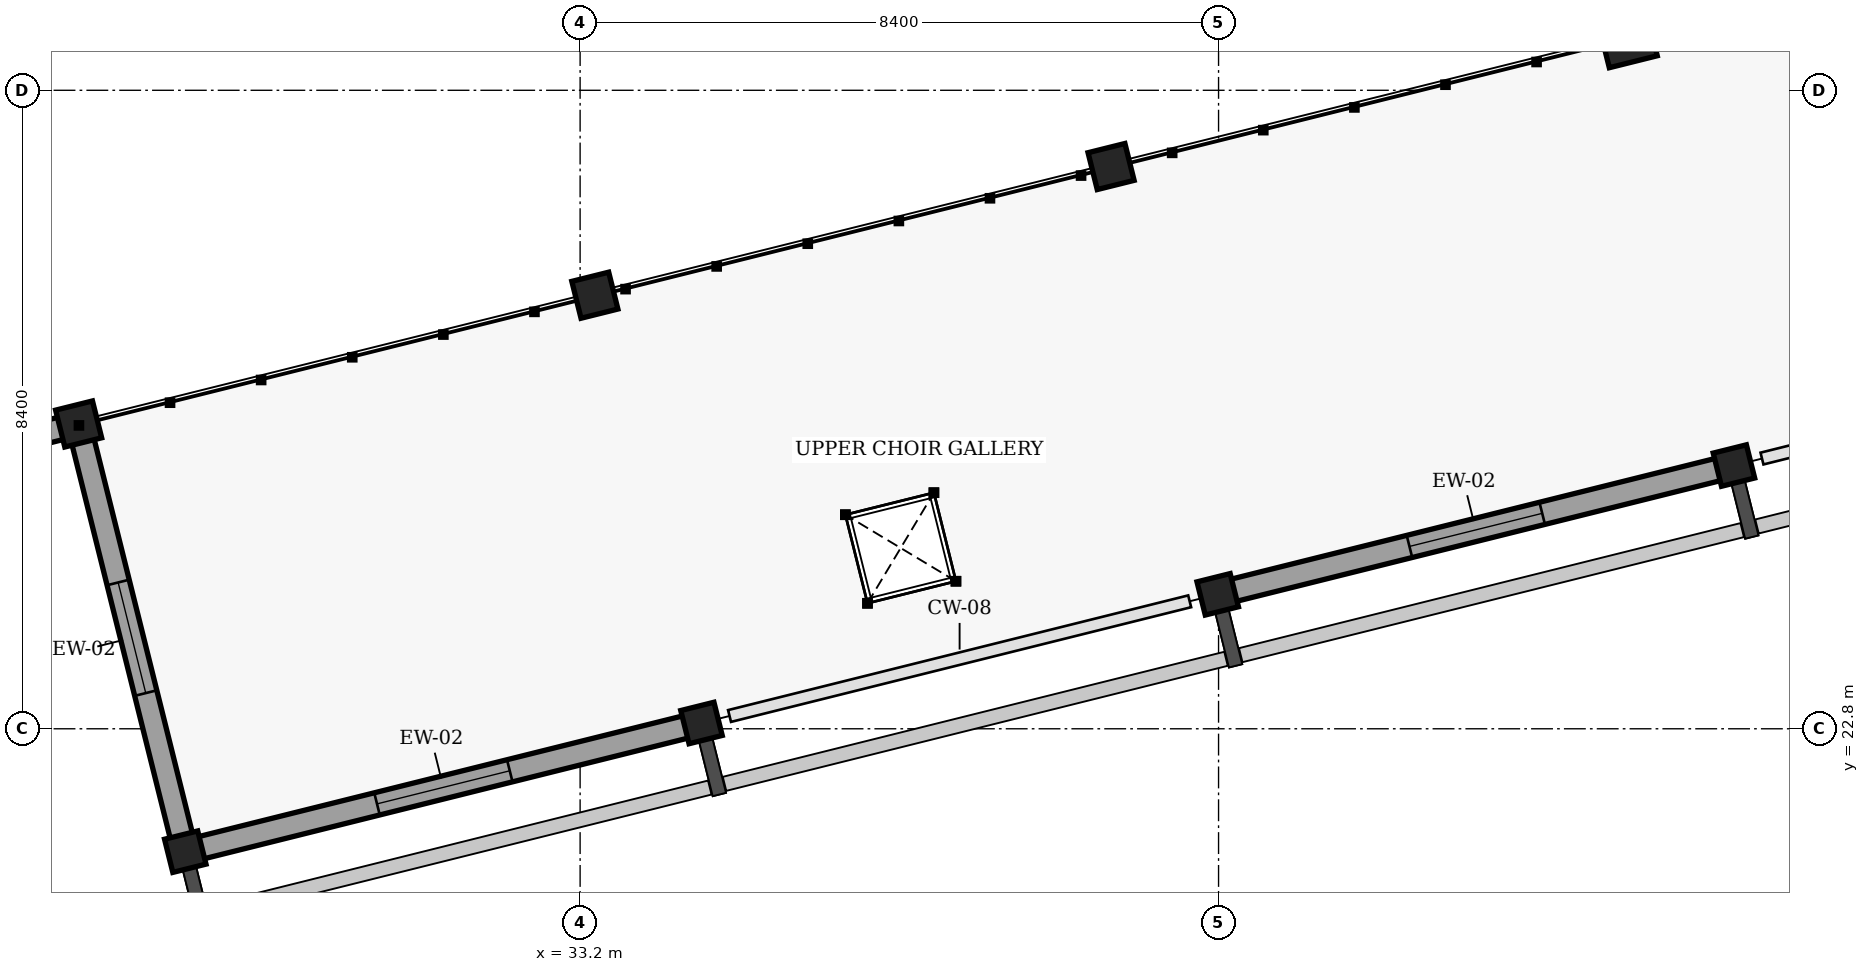
"""IFC4 building model, lengths in metres.
Left out: names, types, materials, properties, quantities, classifications, styles, units other than length and angle.
Written with IfcOpenShell. Run it as: python <this file> out.ifc"""

import sys

from ifc_helpers import new_model, si_unit, direction, frame, frame_2d, origin, origin_2d, place, context, subcontext, project, spatial, rectangle, extrude, element, fill, save


model = new_model("IFC4")
c1 = context("Model", 3, precision=1e-05, world=origin(), true_north=direction((0.0, 1.0)))
c2 = subcontext(c1, "Body", "Model", "MODEL_VIEW")
j1 = project(units=[si_unit("LENGTHUNIT", "METRE"), si_unit("PLANEANGLEUNIT", "RADIAN")], contexts=[c1])
p1 = place(None, origin())
s1 = spatial("IfcSite", under=j1, at=p1, CompositionType="ELEMENT")
p2 = place(p1, origin())
s2 = spatial("IfcBuilding", under=s1, at=p2, CompositionType="ELEMENT")
p3 = place(p2, frame((0.0, 0.0, 9.0)))
s3 = spatial("IfcBuildingStorey", under=s2, at=p3, CompositionType="ELEMENT", Elevation=9.0)
p4 = place(p3, frame((46.978, 31.891, 0.0), z_axis=(0.0, 0.0, 1.0), x_axis=(0.970295726276, 0.2419218956, 0.0)))
e1 = element("IfcColumn", 1, at=p4, inside=s3, PredefinedType="COLUMN", context=c2, shape_type="SweptSolid", body=[
    extrude(rectangle(XDim=0.65, YDim=0.65, at=origin_2d()), origin(), (0.0, 0.0, 1.0), 3.9),
])
for number, where, z_axis, x_axis in (
    (2, (28.005, 21.183, 0.0), (0.0, 0.0, 1.0), (0.97, 0.242, 0.0)),
    (3, (34.797, 22.876, 0.0), (0.0, 0.0, 1.0), (0.97, 0.242, 0.0)),
    (4, (41.589, 24.569, 0.0), (0.0, 0.0, 1.0), (0.97, 0.242, 0.0)),
    (5, (48.381, 26.263, 0.0), (0.0, 0.0, 1.0), (0.97, 0.242, 0.0)),
):
    element("IfcColumn", number, at=place(p3, frame(where, z_axis=z_axis, x_axis=x_axis)), inside=s3, PredefinedType="COLUMN", context=c2, shape_type="SweptSolid", body=[
        extrude(rectangle(XDim=0.45, YDim=0.45, at=origin_2d()), origin(), (0.0, 0.0, 1.0), 3.9),
    ])
for number, where, z_axis, x_axis in (
    (6, (26.602, 26.81, 0.0), (0.0, 0.0, 1.0), (0.97, 0.242, 0.0)),
    (7, (33.394, 28.504, 0.0), (0.0, 0.0, 1.0), (0.97, 0.242, 0.0)),
    (8, (40.186, 30.197, 0.0), (0.0, 0.0, 1.0), (0.97, 0.242, 0.0)),
):
    element("IfcColumn", number, at=place(p3, frame(where, z_axis=z_axis, x_axis=x_axis)), inside=s3, PredefinedType="COLUMN", context=c2, shape_type="SweptSolid", body=[
        extrude(rectangle(XDim=0.5, YDim=0.5, at=origin_2d()), origin(), (0.0, 0.0, 1.0), 3.9),
    ])
p5 = place(p3, frame((28.102, 21.207, 0.0), z_axis=(0.0, 0.0, 1.0), x_axis=(0.970296478685, 0.241918877831, 0.0)))
e9 = element("IfcWall", 9, at=p5, inside=s3, PredefinedType="SOLIDWALL", context=c2, shape_type="SweptSolid", body=[
    extrude(rectangle(XDim=6.8, YDim=0.3, at=frame_2d((3.4, 0.0))), origin(), (0.0, 0.0, 1.0), 3.135),
])
p6 = place(p5, frame((2.5, 0.0, 0.9)))
e10 = element("IfcOpeningElement", 10, at=p6, cuts=e9, PredefinedType="OPENING", context=c2, shape_type="SweptSolid", body=[
    extrude(rectangle(XDim=1.8, YDim=1.8, at=frame_2d((0.9, 0.9))), frame((0.0, 0.16, 0.0), z_axis=(0.0, -1.0, 0.0), x_axis=(1.0, 0.0, 0.0)), (0.0, 0.0, 1.0), 0.32),
])
p7 = place(p3, frame((41.686, 24.594, 0.0), z_axis=(0.0, 0.0, 1.0), x_axis=(0.970296478685, 0.241918877831, 0.0)))
e11 = element("IfcWall", 11, at=p7, inside=s3, PredefinedType="SOLIDWALL", context=c2, shape_type="SweptSolid", body=[
    extrude(rectangle(XDim=6.8, YDim=0.3, at=frame_2d((3.4, 0.0))), origin(), (0.0, 0.0, 1.0), 3.135),
])
p8 = place(p7, frame((2.5, 0.0, 0.9)))
e12 = element("IfcOpeningElement", 12, at=p8, cuts=e11, PredefinedType="OPENING", context=c2, shape_type="SweptSolid", body=[
    extrude(rectangle(XDim=1.8, YDim=1.8, at=frame_2d((0.9, 0.9))), frame((0.0, 0.16, 0.0), z_axis=(0.0, -1.0, 0.0), x_axis=(1.0, 0.0, 0.0)), (0.0, 0.0, 1.0), 0.32),
])
p9 = place(p3, frame((27.986, 21.261, 0.0), z_axis=(0.0, 0.0, 1.0), x_axis=(-0.242077152267, 0.970257003247, 0.0)))
e13 = element("IfcWall", 13, at=p9, inside=s3, PredefinedType="SOLIDWALL", context=c2, shape_type="SweptSolid", body=[
    extrude(rectangle(XDim=5.639, YDim=0.3, at=frame_2d((2.819, 0.0))), origin(), (0.0, 0.0, 1.0), 3.45),
])
p10 = place(p9, frame((2.07, 0.0, 0.9)))
e14 = element("IfcOpeningElement", 14, at=p10, cuts=e13, PredefinedType="OPENING", context=c2, shape_type="SweptSolid", body=[
    extrude(rectangle(XDim=1.5, YDim=1.5, at=frame_2d((0.75, 0.75))), frame((0.0, 0.16, 0.0), z_axis=(0.0, -1.0, 0.0), x_axis=(1.0, 0.0, 0.0)), (0.0, 0.0, 1.0), 0.32),
])
p11 = place(p3, frame((19.887, 25.136, 0.0), z_axis=(0.0, 0.0, 1.0), x_axis=(0.970287194641, 0.241956111549, 0.0)))
e15 = element("IfcWall", 15, at=p11, inside=s3, PredefinedType="SOLIDWALL", context=c2, shape_type="SweptSolid", body=[
    extrude(rectangle(XDim=6.84, YDim=0.3, at=frame_2d((3.42, 0.0))), origin(), (0.0, 0.0, 1.0), 3.45),
])
p12 = place(p11, frame((2.67, 0.0, 0.9)))
e16 = element("IfcOpeningElement", 16, at=p12, cuts=e15, PredefinedType="OPENING", context=c2, shape_type="SweptSolid", body=[
    extrude(rectangle(XDim=1.5, YDim=1.5, at=frame_2d((0.75, 0.75))), frame((0.0, 0.16, 0.0), z_axis=(0.0, -1.0, 0.0), x_axis=(1.0, 0.0, 0.0)), (0.0, 0.0, 1.0), 0.32),
])
p13 = place(p3, frame((50.593, 27.851, 0.0), z_axis=(0.0, 0.0, 1.0), x_axis=(-0.241975869228, 0.970282267544, 0.0)))
e17 = element("IfcWall", 17, at=p13, inside=s3, PredefinedType="SHEAR", context=c2, shape_type="SweptSolid", body=[
    extrude(rectangle(XDim=7.389, YDim=0.25, at=frame_2d((3.695, 0.0))), origin(), (0.0, 0.0, 1.0), 3.66),
])
p14 = place(p6, origin())
e18 = element("IfcWindow", 18, at=p14, inside=s3, PartitioningType="SINGLE_PANEL", PredefinedType="WINDOW", context=c2, shape_type="SweptSolid", body=[
    extrude(rectangle(XDim=1.8, YDim=1.8, at=frame_2d((0.9, 0.9))), frame((0.0, 0.03, 0.0), z_axis=(0.0, -1.0, 0.0), x_axis=(1.0, 0.0, 0.0)), (0.0, 0.0, 1.0), 0.06),
])
fill(e10, e18)
p15 = place(p8, origin())
e19 = element("IfcWindow", 19, at=p15, inside=s3, PartitioningType="SINGLE_PANEL", PredefinedType="WINDOW", context=c2, shape_type="SweptSolid", body=[
    extrude(rectangle(XDim=1.8, YDim=1.8, at=frame_2d((0.9, 0.9))), frame((0.0, 0.03, 0.0), z_axis=(0.0, -1.0, 0.0), x_axis=(1.0, 0.0, 0.0)), (0.0, 0.0, 1.0), 0.06),
])
fill(e12, e19)
p16 = place(p10, origin())
e20 = element("IfcWindow", 20, at=p16, inside=s3, PartitioningType="SINGLE_PANEL", PredefinedType="WINDOW", context=c2, shape_type="SweptSolid", body=[
    extrude(rectangle(XDim=1.5, YDim=1.5, at=frame_2d((0.75, 0.75))), frame((0.0, 0.03, 0.0), z_axis=(0.0, -1.0, 0.0), x_axis=(1.0, 0.0, 0.0)), (0.0, 0.0, 1.0), 0.06),
])
fill(e14, e20)
save(model, sys.argv[1])
